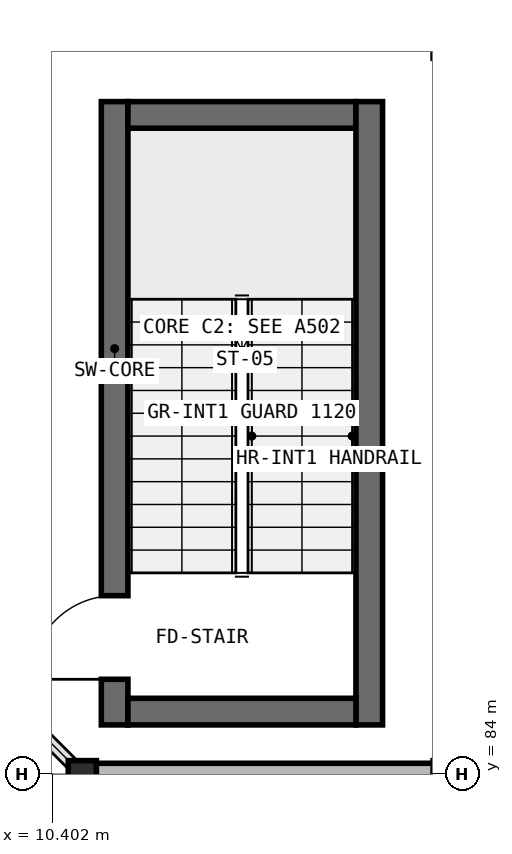
"""IFC4 building model, lengths in metres.
Left out: names, types, materials, properties, quantities, classifications, styles, units other than length and angle.
Written with IfcOpenShell. Run it as: python <this file> out.ifc"""

import sys

from ifc_helpers import new_model, si_unit, direction, frame, frame_2d, origin, origin_2d, place, context, subcontext, project, spatial, rectangle, i_section, extrude, element, fill, save


model = new_model("IFC4")
c1 = context("Model", 3, precision=1e-05, world=origin(), true_north=direction((0.0, 1.0)))
c2 = subcontext(c1, "Body", "Model", "MODEL_VIEW")
j1 = project(units=[si_unit("LENGTHUNIT", "METRE"), si_unit("PLANEANGLEUNIT", "RADIAN")], contexts=[c1])
p1 = place(None, origin())
s1 = spatial("IfcSite", under=j1, at=p1, CompositionType="ELEMENT")
p2 = place(p1, origin())
s2 = spatial("IfcBuilding", under=s1, at=p2, CompositionType="ELEMENT")
p3 = place(p2, frame((0.0, 0.0, 14.35)))
s3 = spatial("IfcBuildingStorey", under=s2, at=p3, CompositionType="ELEMENT", Elevation=14.35)
p4 = place(p3, frame((11.225, 84.65, 0.0), z_axis=(0.0, 0.0, 1.0), x_axis=(0.0, 1.0, 0.0)))
e1 = element("IfcWall", 1, at=p4, inside=s3, PredefinedType="SHEAR", context=c2, shape_type="SweptSolid", body=[
    extrude(rectangle(XDim=8.2, YDim=0.35, at=frame_2d((4.1, 0.0))), origin(), (0.0, 0.0, 1.0), 4.55),
])
p5 = place(p4, frame((0.6, 0.0, 0.0)))
e2 = element("IfcOpeningElement", 2, at=p5, cuts=e1, PredefinedType="OPENING", context=c2, shape_type="SweptSolid", body=[
    extrude(rectangle(XDim=1.1, YDim=2.15, at=frame_2d((0.55, 1.075))), frame((0.0, 0.185, 0.0), z_axis=(0.0, -1.0, 0.0), x_axis=(1.0, 0.0, 0.0)), (0.0, 0.0, 1.0), 0.37),
])
p6 = place(p3, frame((11.4, 92.675, 0.0), z_axis=(0.0, 0.0, 1.0), x_axis=(1.0, 0.0, 0.0)))
e3 = element("IfcWall", 3, at=p6, inside=s3, PredefinedType="SHEAR", context=c2, shape_type="SweptSolid", body=[
    extrude(rectangle(XDim=3.0, YDim=0.35, at=frame_2d((1.5, 0.0))), origin(), (0.0, 0.0, 1.0), 4.55),
])
p7 = place(p3, frame((14.575, 92.85, 0.0), z_axis=(0.0, 0.0, 1.0), x_axis=(0.0, -1.0, 0.0)))
e4 = element("IfcWall", 4, at=p7, inside=s3, PredefinedType="SHEAR", context=c2, shape_type="SweptSolid", body=[
    extrude(rectangle(XDim=8.2, YDim=0.35, at=frame_2d((4.1, 0.0))), origin(), (0.0, 0.0, 1.0), 4.55),
])
p8 = place(p3, frame((14.4, 84.825, 0.0), z_axis=(0.0, 0.0, 1.0), x_axis=(-1.0, 0.0, 0.0)))
e5 = element("IfcWall", 5, at=p8, inside=s3, PredefinedType="SHEAR", context=c2, shape_type="SweptSolid", body=[
    extrude(rectangle(XDim=3.0, YDim=0.35, at=frame_2d((1.5, 0.0))), origin(), (0.0, 0.0, 1.0), 4.55),
])
p9 = place(p3, frame((10.8, 84.0, 0.0), z_axis=(0.0, 0.0, 1.0), x_axis=(1.0, 0.0, 0.0)))
e6 = element("IfcColumn", 6, at=p9, inside=s3, PredefinedType="COLUMN", context=c2, shape_type="SweptSolid", body=[
    extrude(i_section(OverallWidth=0.37, OverallDepth=0.36, WebThickness=0.014, FlangeThickness=0.022, at=origin_2d()), origin(), (0.0, 0.0, 1.0), 4.55),
])
p10 = place(p3, frame((15.596, 84.0, 0.0), z_axis=(0.0, 0.0, 1.0), x_axis=(-1.0, 0.0, 0.0)))
e7 = element("IfcWall", 7, at=p10, inside=s3, PredefinedType="SOLIDWALL", context=c2, shape_type="SweptSolid", body=[
    extrude(rectangle(XDim=4.792, YDim=0.29, at=frame_2d((2.396, 0.0))), origin(), (0.0, 0.0, 1.0), 4.37),
])
p11 = place(p5, origin())
e8 = element("IfcDoor", 8, at=p11, inside=s3, OperationType="SINGLE_SWING_LEFT", PredefinedType="DOOR", context=c2, shape_type="SweptSolid", body=[
    extrude(rectangle(XDim=1.1, YDim=2.15, at=frame_2d((0.55, 1.075))), frame((0.0, 0.025, 0.0), z_axis=(0.0, -1.0, 0.0), x_axis=(1.0, 0.0, 0.0)), (0.0, 0.0, 1.0), 0.05),
])
fill(e2, e8)
save(model, sys.argv[1])
